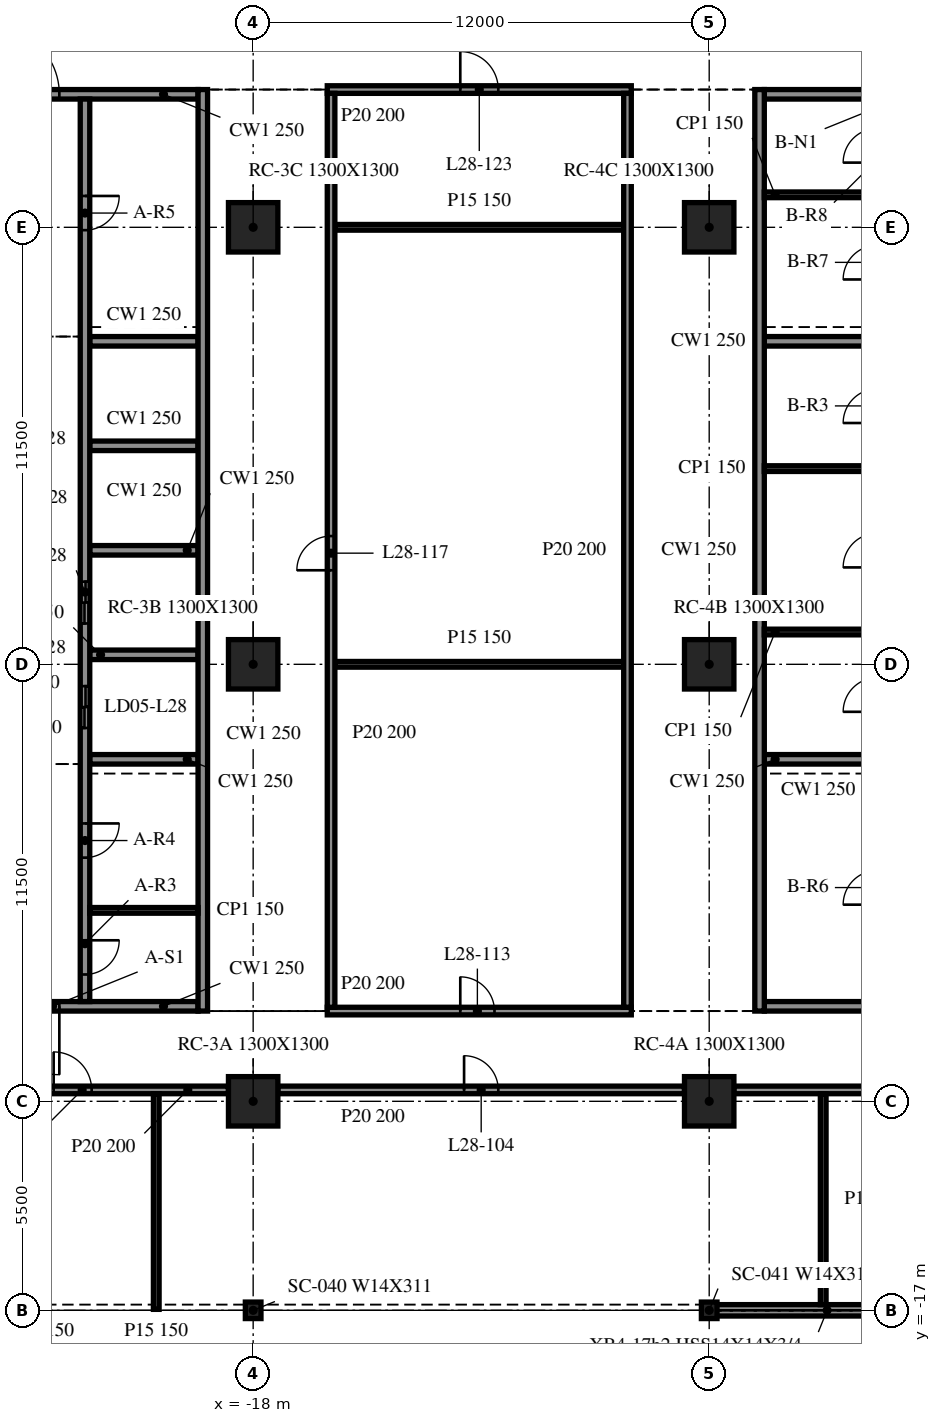
"""IFC4 building model, lengths in metres.
Left out: names, types, materials, properties, quantities, classifications, styles, units other than length and angle.
Written with IfcOpenShell. Run it as: python <this file> out.ifc"""

import sys

from ifc_helpers import new_model, si_unit, direction, frame, frame_2d, origin, origin_2d, place, context, subcontext, project, spatial, rectangle, i_section, extrude, element, fill, save


model = new_model("IFC4")
c1 = context("Model", 3, precision=1e-05, world=origin(), true_north=direction((0.0, 1.0)))
c2 = subcontext(c1, "Body", "Model", "MODEL_VIEW")
j1 = project(units=[si_unit("LENGTHUNIT", "METRE"), si_unit("PLANEANGLEUNIT", "RADIAN")], contexts=[c1])
p1 = place(None, origin())
s1 = spatial("IfcSite", under=j1, at=p1, CompositionType="ELEMENT")
p2 = place(p1, origin())
s2 = spatial("IfcBuilding", under=s1, at=p2, CompositionType="ELEMENT")
p3 = place(p2, frame((0.0, 0.0, 122.0)))
s3 = spatial("IfcBuildingStorey", under=s2, at=p3, CompositionType="ELEMENT", Elevation=122.0)
for number, where, z_axis, x_axis in (
    (1, (-18.0, -11.5, -0.34), (0.0, 0.0, 1.0), (1.0, 0.0, 0.0)),
    (2, (-18.0, 0.0, -0.34), (0.0, 0.0, 1.0), (1.0, 0.0, 0.0)),
    (3, (-18.0, 11.5, -0.34), (0.0, 0.0, 1.0), (1.0, 0.0, 0.0)),
    (4, (-6.0, -11.5, -0.34), (0.0, 0.0, 1.0), (1.0, 0.0, 0.0)),
    (5, (-6.0, 0.0, -0.34), (0.0, 0.0, 1.0), (1.0, 0.0, 0.0)),
    (6, (-6.0, 11.5, -0.34), (0.0, 0.0, 1.0), (1.0, 0.0, 0.0)),
):
    element("IfcColumn", number, at=place(p3, frame(where, z_axis=z_axis, x_axis=x_axis)), inside=s3, PredefinedType="COLUMN", context=c2, shape_type="SweptSolid", body=[
        extrude(rectangle(XDim=1.3, YDim=1.3, at=origin_2d()), origin(), (0.0, 0.0, 1.0), 4.1),
    ])
for number, where, z_axis, x_axis in (
    (7, (-18.0, -17.0, -0.34), (0.0, 0.0, 1.0), (1.0, 0.0, 0.0)),
    (8, (-6.0, -17.0, -0.34), (0.0, 0.0, 1.0), (1.0, 0.0, 0.0)),
):
    element("IfcColumn", number, at=place(p3, frame(where, z_axis=z_axis, x_axis=x_axis)), inside=s3, PredefinedType="COLUMN", context=c2, shape_type="SweptSolid", body=[
        extrude(i_section(OverallWidth=0.412, OverallDepth=0.434, WebThickness=0.036, FlangeThickness=0.057, at=origin_2d()), origin(), (0.0, 0.0, 1.0), 4.1),
    ])
p4 = place(p3, frame((-5.982, -17.0, 0.0), z_axis=(0.0, 0.0, 1.0), x_axis=(1.0, 0.0, 0.0)))
e9 = element("IfcWall", 9, at=p4, inside=s3, PredefinedType="NOTDEFINED", context=c2, shape_type="SweptSolid", body=[
    extrude(rectangle(XDim=11.964, YDim=0.3, at=frame_2d((5.982, 0.0))), origin(), (0.0, 0.0, 1.0), 3.003),
])
p5 = place(p3, frame((-19.325, -9.125, 0.0), z_axis=(0.0, 0.0, 1.0), x_axis=(0.0, 1.0, 0.0)))
e10 = element("IfcWall", 10, at=p5, inside=s3, PredefinedType="SOLIDWALL", context=c2, shape_type="SweptSolid", body=[
    extrude(rectangle(XDim=24.25, YDim=0.25, at=frame_2d((12.125, 0.0))), origin(), (0.0, 0.0, 1.0), 3.76),
])
p6 = place(p3, frame((-19.45, -9.0, 0.0), z_axis=(0.0, 0.0, 1.0), x_axis=(-1.0, 0.0, 0.0)))
e11 = element("IfcWall", 11, at=p6, inside=s3, PredefinedType="SOLIDWALL", context=c2, shape_type="SweptSolid", body=[
    extrude(rectangle(XDim=9.1, YDim=0.25, at=frame_2d((4.55, 0.0))), origin(), (0.0, 0.0, 1.0), 3.76),
])
p7 = place(p6, frame((3.65, 0.0, 0.0)))
e12 = element("IfcOpeningElement", 12, at=p7, cuts=e11, PredefinedType="OPENING", context=c2, shape_type="SweptSolid", body=[
    extrude(rectangle(XDim=1.8, YDim=2.1, at=frame_2d((0.9, 1.05))), frame((0.0, 0.135, 0.0), z_axis=(0.0, -1.0, 0.0), x_axis=(1.0, 0.0, 0.0)), (0.0, 0.0, 1.0), 0.27),
])
p8 = place(p3, frame((-28.55, 15.0, 0.0), z_axis=(0.0, 0.0, 1.0), x_axis=(1.0, 0.0, 0.0)))
e13 = element("IfcWall", 13, at=p8, inside=s3, PredefinedType="SOLIDWALL", context=c2, shape_type="SweptSolid", body=[
    extrude(rectangle(XDim=9.1, YDim=0.25, at=frame_2d((4.55, 0.0))), origin(), (0.0, 0.0, 1.0), 3.76),
])
p9 = place(p8, frame((3.65, 0.0, 0.0)))
e14 = element("IfcOpeningElement", 14, at=p9, cuts=e13, PredefinedType="OPENING", context=c2, shape_type="SweptSolid", body=[
    extrude(rectangle(XDim=1.8, YDim=2.1, at=frame_2d((0.9, 1.05))), frame((0.0, 0.135, 0.0), z_axis=(0.0, -1.0, 0.0), x_axis=(1.0, 0.0, 0.0)), (0.0, 0.0, 1.0), 0.27),
])
p10 = place(p3, frame((-22.425, 14.875, 0.0), z_axis=(0.0, 0.0, 1.0), x_axis=(0.0, -1.0, 0.0)))
e15 = element("IfcWall", 15, at=p10, inside=s3, PredefinedType="SOLIDWALL", context=c2, shape_type="SweptSolid", body=[
    extrude(rectangle(XDim=23.75, YDim=0.25, at=frame_2d((11.875, 0.0))), origin(), (0.0, 0.0, 1.0), 3.76),
])
p11 = place(p10, frame((15.45, 0.0, 0.0)))
e16 = element("IfcOpeningElement", 16, at=p11, cuts=e15, PredefinedType="OPENING", context=c2, shape_type="SweptSolid", body=[
    extrude(rectangle(XDim=1.1, YDim=2.1, at=frame_2d((0.55, 1.05))), frame((0.0, 0.135, 0.0), z_axis=(0.0, -1.0, 0.0), x_axis=(1.0, 0.0, 0.0)), (0.0, 0.0, 1.0), 0.27),
])
p12 = place(p10, frame((12.7, 0.0, 0.0)))
e17 = element("IfcOpeningElement", 17, at=p12, cuts=e15, PredefinedType="OPENING", context=c2, shape_type="SweptSolid", body=[
    extrude(rectangle(XDim=1.1, YDim=2.1, at=frame_2d((0.55, 1.05))), frame((0.0, 0.135, 0.0), z_axis=(0.0, -1.0, 0.0), x_axis=(1.0, 0.0, 0.0)), (0.0, 0.0, 1.0), 0.27),
])
p13 = place(p10, frame((22.137, 0.0, 0.0)))
e18 = element("IfcOpeningElement", 18, at=p13, cuts=e15, PredefinedType="OPENING", context=c2, shape_type="SweptSolid", body=[
    extrude(rectangle(XDim=0.9, YDim=2.1, at=frame_2d((0.45, 1.05))), frame((0.0, 0.135, 0.0), z_axis=(0.0, -1.0, 0.0), x_axis=(1.0, 0.0, 0.0)), (0.0, 0.0, 1.0), 0.27),
])
p14 = place(p10, frame((19.062, 0.0, 0.0)))
e19 = element("IfcOpeningElement", 19, at=p14, cuts=e15, PredefinedType="OPENING", context=c2, shape_type="SweptSolid", body=[
    extrude(rectangle(XDim=0.9, YDim=2.1, at=frame_2d((0.45, 1.05))), frame((0.0, 0.135, 0.0), z_axis=(0.0, -1.0, 0.0), x_axis=(1.0, 0.0, 0.0)), (0.0, 0.0, 1.0), 0.27),
])
p15 = place(p10, frame((2.55, 0.0, 0.0)))
e20 = element("IfcOpeningElement", 20, at=p15, cuts=e15, PredefinedType="OPENING", context=c2, shape_type="SweptSolid", body=[
    extrude(rectangle(XDim=0.9, YDim=2.1, at=frame_2d((0.45, 1.05))), frame((0.0, 0.135, 0.0), z_axis=(0.0, -1.0, 0.0), x_axis=(1.0, 0.0, 0.0)), (0.0, 0.0, 1.0), 0.27),
])
for number, where, z_axis, x_axis in (
    (21, (-22.3, -2.5, 0.0), (0.0, 0.0, 1.0), (1.0, 0.0, 0.0)),
    (22, (-22.3, 0.25, 0.0), (0.0, 0.0, 1.0), (1.0, 0.0, 0.0)),
    (23, (-22.3, 3.0, 0.0), (0.0, 0.0, 1.0), (1.0, 0.0, 0.0)),
    (24, (-22.3, 5.75, 0.0), (0.0, 0.0, 1.0), (1.0, 0.0, 0.0)),
    (25, (-22.3, 8.5, 0.0), (0.0, 0.0, 1.0), (1.0, 0.0, 0.0)),
):
    element("IfcWall", number, at=place(p3, frame(where, z_axis=z_axis, x_axis=x_axis)), inside=s3, PredefinedType="SOLIDWALL", context=c2, shape_type="SweptSolid", body=[
        extrude(rectangle(XDim=2.85, YDim=0.25, at=frame_2d((1.425, 0.0))), origin(), (0.0, 0.0, 1.0), 3.76),
    ])
p16 = place(p3, frame((-22.3, -6.475, 0.0), z_axis=(0.0, 0.0, 1.0), x_axis=(1.0, 0.0, 0.0)))
e26 = element("IfcWall", 26, at=p16, inside=s3, PredefinedType="PARTITIONING", context=c2, shape_type="SweptSolid", body=[
    extrude(rectangle(XDim=2.85, YDim=0.15, at=frame_2d((1.425, 0.0))), origin(), (0.0, 0.0, 1.0), 3.76),
])
p17 = place(p3, frame((-4.675, 15.125, 0.0), z_axis=(0.0, 0.0, 1.0), x_axis=(0.0, -1.0, 0.0)))
e27 = element("IfcWall", 27, at=p17, inside=s3, PredefinedType="SOLIDWALL", context=c2, shape_type="SweptSolid", body=[
    extrude(rectangle(XDim=24.25, YDim=0.25, at=frame_2d((12.125, 0.0))), origin(), (0.0, 0.0, 1.0), 3.76),
])
p18 = place(p3, frame((4.55, -9.0, 0.0), z_axis=(0.0, 0.0, 1.0), x_axis=(-1.0, 0.0, 0.0)))
e28 = element("IfcWall", 28, at=p18, inside=s3, PredefinedType="SOLIDWALL", context=c2, shape_type="SweptSolid", body=[
    extrude(rectangle(XDim=9.1, YDim=0.25, at=frame_2d((4.55, 0.0))), origin(), (0.0, 0.0, 1.0), 3.76),
])
p19 = place(p18, frame((3.65, 0.0, 0.0)))
e29 = element("IfcOpeningElement", 29, at=p19, cuts=e28, PredefinedType="OPENING", context=c2, shape_type="SweptSolid", body=[
    extrude(rectangle(XDim=1.8, YDim=2.1, at=frame_2d((0.9, 1.05))), frame((0.0, 0.135, 0.0), z_axis=(0.0, -1.0, 0.0), x_axis=(1.0, 0.0, 0.0)), (0.0, 0.0, 1.0), 0.27),
])
p20 = place(p3, frame((-4.55, 15.0, 0.0), z_axis=(0.0, 0.0, 1.0), x_axis=(1.0, 0.0, 0.0)))
e30 = element("IfcWall", 30, at=p20, inside=s3, PredefinedType="SOLIDWALL", context=c2, shape_type="SweptSolid", body=[
    extrude(rectangle(XDim=9.1, YDim=0.25, at=frame_2d((4.55, 0.0))), origin(), (0.0, 0.0, 1.0), 3.76),
])
p21 = place(p20, frame((3.65, 0.0, 0.0)))
e31 = element("IfcOpeningElement", 31, at=p21, cuts=e30, PredefinedType="OPENING", context=c2, shape_type="SweptSolid", body=[
    extrude(rectangle(XDim=1.8, YDim=2.1, at=frame_2d((0.9, 1.05))), frame((0.0, 0.135, 0.0), z_axis=(0.0, -1.0, 0.0), x_axis=(1.0, 0.0, 0.0)), (0.0, 0.0, 1.0), 0.27),
])
for number, where, z_axis, x_axis in (
    (32, (-4.55, -2.5, 0.0), (0.0, 0.0, 1.0), (1.0, 0.0, 0.0)),
    (33, (-4.55, 8.5, 0.0), (0.0, 0.0, 1.0), (1.0, 0.0, 0.0)),
):
    element("IfcWall", number, at=place(p3, frame(where, z_axis=z_axis, x_axis=x_axis)), inside=s3, PredefinedType="SOLIDWALL", context=c2, shape_type="SweptSolid", body=[
        extrude(rectangle(XDim=2.85, YDim=0.25, at=frame_2d((1.425, 0.0))), origin(), (0.0, 0.0, 1.0), 3.76),
    ])
for number, where, z_axis, x_axis in (
    (34, (-4.55, 0.85, 0.0), (0.0, 0.0, 1.0), (1.0, 0.0, 0.0)),
    (35, (-4.55, 5.15, 0.0), (0.0, 0.0, 1.0), (1.0, 0.0, 0.0)),
    (36, (-4.55, 12.355, 0.0), (0.0, 0.0, 1.0), (1.0, 0.0, 0.0)),
):
    element("IfcWall", number, at=place(p3, frame(where, z_axis=z_axis, x_axis=x_axis)), inside=s3, PredefinedType="PARTITIONING", context=c2, shape_type="SweptSolid", body=[
        extrude(rectangle(XDim=2.85, YDim=0.15, at=frame_2d((1.425, 0.0))), origin(), (0.0, 0.0, 1.0), 3.76),
    ])
p22 = place(p3, frame((-29.35, -11.2, 0.0), z_axis=(0.0, 0.0, 1.0), x_axis=(1.0, 0.0, 0.0)))
e37 = element("IfcWall", 37, at=p22, inside=s3, PredefinedType="PARTITIONING", context=c2, shape_type="SweptSolid", body=[
    extrude(rectangle(XDim=10.7, YDim=0.2, at=frame_2d((5.35, 0.0))), origin(), (0.0, 0.0, 1.0), 3.76),
])
p23 = place(p22, frame((4.5, 0.0, 0.0)))
e38 = element("IfcOpeningElement", 38, at=p23, cuts=e37, PredefinedType="OPENING", context=c2, shape_type="SweptSolid", body=[
    extrude(rectangle(XDim=1.0, YDim=2.1, at=frame_2d((0.5, 1.05))), frame((0.0, 0.11, 0.0), z_axis=(0.0, -1.0, 0.0), x_axis=(1.0, 0.0, 0.0)), (0.0, 0.0, 1.0), 0.22),
])
p24 = place(p22, frame((6.1, 0.0, 0.0)))
e39 = element("IfcOpeningElement", 39, at=p24, cuts=e37, PredefinedType="OPENING", context=c2, shape_type="SweptSolid", body=[
    extrude(rectangle(XDim=1.0, YDim=2.1, at=frame_2d((0.5, 1.05))), frame((0.0, 0.11, 0.0), z_axis=(0.0, -1.0, 0.0), x_axis=(1.0, 0.0, 0.0)), (0.0, 0.0, 1.0), 0.22),
])
p25 = place(p3, frame((-17.35, -11.2, 0.0), z_axis=(0.0, 0.0, 1.0), x_axis=(1.0, 0.0, 0.0)))
e40 = element("IfcWall", 40, at=p25, inside=s3, PredefinedType="PARTITIONING", context=c2, shape_type="SweptSolid", body=[
    extrude(rectangle(XDim=10.7, YDim=0.2, at=frame_2d((5.35, 0.0))), origin(), (0.0, 0.0, 1.0), 3.76),
])
p26 = place(p25, frame((4.9, 0.0, 0.0)))
e41 = element("IfcOpeningElement", 41, at=p26, cuts=e40, PredefinedType="OPENING", context=c2, shape_type="SweptSolid", body=[
    extrude(rectangle(XDim=0.9, YDim=2.1, at=frame_2d((0.45, 1.05))), frame((0.0, 0.11, 0.0), z_axis=(0.0, -1.0, 0.0), x_axis=(1.0, 0.0, 0.0)), (0.0, 0.0, 1.0), 0.22),
])
p27 = place(p3, frame((-5.35, -11.2, 0.0), z_axis=(0.0, 0.0, 1.0), x_axis=(1.0, 0.0, 0.0)))
e42 = element("IfcWall", 42, at=p27, inside=s3, PredefinedType="PARTITIONING", context=c2, shape_type="SweptSolid", body=[
    extrude(rectangle(XDim=10.7, YDim=0.2, at=frame_2d((5.35, 0.0))), origin(), (0.0, 0.0, 1.0), 3.76),
])
p28 = place(p27, frame((4.7, 0.0, 0.0)))
e43 = element("IfcOpeningElement", 43, at=p28, cuts=e42, PredefinedType="OPENING", context=c2, shape_type="SweptSolid", body=[
    extrude(rectangle(XDim=1.2, YDim=2.1, at=frame_2d((0.6, 1.05))), frame((0.0, 0.11, 0.0), z_axis=(0.0, -1.0, 0.0), x_axis=(1.0, 0.0, 0.0)), (0.0, 0.0, 1.0), 0.22),
])
p29 = place(p27, frame((8.7, 0.0, 0.0)))
e44 = element("IfcOpeningElement", 44, at=p29, cuts=e42, PredefinedType="OPENING", context=c2, shape_type="SweptSolid", body=[
    extrude(rectangle(XDim=0.9, YDim=2.1, at=frame_2d((0.45, 1.05))), frame((0.0, 0.11, 0.0), z_axis=(0.0, -1.0, 0.0), x_axis=(1.0, 0.0, 0.0)), (0.0, 0.0, 1.0), 0.22),
])
p30 = place(p3, frame((-16.05, -9.125, 0.0), z_axis=(0.0, 0.0, 1.0), x_axis=(1.0, 0.0, 0.0)))
e45 = element("IfcWall", 45, at=p30, inside=s3, PredefinedType="PARTITIONING", context=c2, shape_type="SweptSolid", body=[
    extrude(rectangle(XDim=8.0, YDim=0.2, at=frame_2d((4.0, 0.0))), origin(), (0.0, 0.0, 1.0), 3.76),
])
p31 = place(p30, frame((3.5, 0.0, 0.0)))
e46 = element("IfcOpeningElement", 46, at=p31, cuts=e45, PredefinedType="OPENING", context=c2, shape_type="SweptSolid", body=[
    extrude(rectangle(XDim=0.9, YDim=2.1, at=frame_2d((0.45, 1.05))), frame((0.0, 0.11, 0.0), z_axis=(0.0, -1.0, 0.0), x_axis=(1.0, 0.0, 0.0)), (0.0, 0.0, 1.0), 0.22),
])
for number, where, z_axis, x_axis in (
    (47, (-15.85, 0.0, 0.0), (0.0, 0.0, 1.0), (1.0, 0.0, 0.0)),
    (48, (-15.85, 11.5, 0.0), (0.0, 0.0, 1.0), (1.0, 0.0, 0.0)),
):
    element("IfcWall", number, at=place(p3, frame(where, z_axis=z_axis, x_axis=x_axis)), inside=s3, PredefinedType="PARTITIONING", context=c2, shape_type="SweptSolid", body=[
        extrude(rectangle(XDim=7.6, YDim=0.15, at=frame_2d((3.8, 0.0))), origin(), (0.0, 0.0, 1.0), 3.76),
    ])
p32 = place(p3, frame((-16.05, 15.125, 0.0), z_axis=(0.0, 0.0, 1.0), x_axis=(1.0, 0.0, 0.0)))
e49 = element("IfcWall", 49, at=p32, inside=s3, PredefinedType="PARTITIONING", context=c2, shape_type="SweptSolid", body=[
    extrude(rectangle(XDim=8.0, YDim=0.2, at=frame_2d((4.0, 0.0))), origin(), (0.0, 0.0, 1.0), 3.76),
])
p33 = place(p32, frame((3.5, 0.0, 0.0)))
e50 = element("IfcOpeningElement", 50, at=p33, cuts=e49, PredefinedType="OPENING", context=c2, shape_type="SweptSolid", body=[
    extrude(rectangle(XDim=1.0, YDim=2.1, at=frame_2d((0.5, 1.05))), frame((0.0, 0.11, 0.0), z_axis=(0.0, -1.0, 0.0), x_axis=(1.0, 0.0, 0.0)), (0.0, 0.0, 1.0), 0.22),
])
p34 = place(p3, frame((-20.55, -16.975, 0.0), z_axis=(0.0, 0.0, 1.0), x_axis=(0.0, 1.0, 0.0)))
e51 = element("IfcWall", 51, at=p34, inside=s3, PredefinedType="PARTITIONING", context=c2, shape_type="SweptSolid", body=[
    extrude(rectangle(XDim=5.675, YDim=0.15, at=frame_2d((2.837, 0.0))), origin(), (0.0, 0.0, 1.0), 3.76),
])
p35 = place(p3, frame((-15.95, -9.025, 0.0), z_axis=(0.0, 0.0, 1.0), x_axis=(0.0, 1.0, 0.0)))
e52 = element("IfcWall", 52, at=p35, inside=s3, PredefinedType="PARTITIONING", context=c2, shape_type="SweptSolid", body=[
    extrude(rectangle(XDim=24.05, YDim=0.2, at=frame_2d((12.025, 0.0))), origin(), (0.0, 0.0, 1.0), 3.76),
])
p36 = place(p35, frame((11.5, 0.0, 0.0)))
e53 = element("IfcOpeningElement", 53, at=p36, cuts=e52, PredefinedType="OPENING", context=c2, shape_type="SweptSolid", body=[
    extrude(rectangle(XDim=0.9, YDim=2.1, at=frame_2d((0.45, 1.05))), frame((0.0, 0.11, 0.0), z_axis=(0.0, -1.0, 0.0), x_axis=(1.0, 0.0, 0.0)), (0.0, 0.0, 1.0), 0.22),
])
p37 = place(p3, frame((-8.15, -9.025, 0.0), z_axis=(0.0, 0.0, 1.0), x_axis=(0.0, 1.0, 0.0)))
e54 = element("IfcWall", 54, at=p37, inside=s3, PredefinedType="PARTITIONING", context=c2, shape_type="SweptSolid", body=[
    extrude(rectangle(XDim=24.05, YDim=0.2, at=frame_2d((12.025, 0.0))), origin(), (0.0, 0.0, 1.0), 3.76),
])
p38 = place(p3, frame((-3.0, -16.85, 0.0), z_axis=(0.0, 0.0, 1.0), x_axis=(0.0, 1.0, 0.0)))
e55 = element("IfcWall", 55, at=p38, inside=s3, PredefinedType="PARTITIONING", context=c2, shape_type="SweptSolid", body=[
    extrude(rectangle(XDim=5.55, YDim=0.15, at=frame_2d((2.775, 0.0))), origin(), (0.0, 0.0, 1.0), 3.76),
])
p39 = place(p7, origin())
e56 = element("IfcDoor", 56, at=p39, inside=s3, OperationType="DOUBLE_DOOR_SINGLE_SWING", PredefinedType="DOOR", context=c2, shape_type="SweptSolid", body=[
    extrude(rectangle(XDim=1.8, YDim=2.1, at=frame_2d((0.9, 1.05))), frame((0.0, 0.025, 0.0), z_axis=(0.0, -1.0, 0.0), x_axis=(1.0, 0.0, 0.0)), (0.0, 0.0, 1.0), 0.05),
])
fill(e12, e56)
p40 = place(p9, origin())
e57 = element("IfcDoor", 57, at=p40, inside=s3, OperationType="DOUBLE_DOOR_SINGLE_SWING", PredefinedType="DOOR", context=c2, shape_type="SweptSolid", body=[
    extrude(rectangle(XDim=1.8, YDim=2.1, at=frame_2d((0.9, 1.05))), frame((0.0, 0.025, 0.0), z_axis=(0.0, -1.0, 0.0), x_axis=(1.0, 0.0, 0.0)), (0.0, 0.0, 1.0), 0.05),
])
fill(e14, e57)
p41 = place(p11, origin())
e58 = element("IfcDoor", 58, at=p41, inside=s3, OperationType="DOUBLE_DOOR_SLIDING", PredefinedType="DOOR", context=c2, shape_type="SweptSolid", body=[
    extrude(rectangle(XDim=1.1, YDim=2.1, at=frame_2d((0.55, 1.05))), frame((0.0, 0.025, 0.0), z_axis=(0.0, -1.0, 0.0), x_axis=(1.0, 0.0, 0.0)), (0.0, 0.0, 1.0), 0.05),
])
fill(e16, e58)
p42 = place(p12, origin())
e59 = element("IfcDoor", 59, at=p42, inside=s3, OperationType="DOUBLE_DOOR_SLIDING", PredefinedType="DOOR", context=c2, shape_type="SweptSolid", body=[
    extrude(rectangle(XDim=1.1, YDim=2.1, at=frame_2d((0.55, 1.05))), frame((0.0, 0.025, 0.0), z_axis=(0.0, -1.0, 0.0), x_axis=(1.0, 0.0, 0.0)), (0.0, 0.0, 1.0), 0.05),
])
fill(e17, e59)
p43 = place(p13, origin())
e60 = element("IfcDoor", 60, at=p43, inside=s3, OperationType="SINGLE_SWING_LEFT", PredefinedType="DOOR", context=c2, shape_type="SweptSolid", body=[
    extrude(rectangle(XDim=0.9, YDim=2.1, at=frame_2d((0.45, 1.05))), frame((0.0, 0.025, 0.0), z_axis=(0.0, -1.0, 0.0), x_axis=(1.0, 0.0, 0.0)), (0.0, 0.0, 1.0), 0.05),
])
fill(e18, e60)
p44 = place(p14, origin())
e61 = element("IfcDoor", 61, at=p44, inside=s3, OperationType="SINGLE_SWING_RIGHT", PredefinedType="DOOR", context=c2, shape_type="SweptSolid", body=[
    extrude(rectangle(XDim=0.9, YDim=2.1, at=frame_2d((0.45, 1.05))), frame((0.0, 0.025, 0.0), z_axis=(0.0, -1.0, 0.0), x_axis=(1.0, 0.0, 0.0)), (0.0, 0.0, 1.0), 0.05),
])
fill(e19, e61)
p45 = place(p15, origin())
e62 = element("IfcDoor", 62, at=p45, inside=s3, OperationType="SINGLE_SWING_LEFT", PredefinedType="DOOR", context=c2, shape_type="SweptSolid", body=[
    extrude(rectangle(XDim=0.9, YDim=2.1, at=frame_2d((0.45, 1.05))), frame((0.0, 0.025, 0.0), z_axis=(0.0, -1.0, 0.0), x_axis=(1.0, 0.0, 0.0)), (0.0, 0.0, 1.0), 0.05),
])
fill(e20, e62)
p46 = place(p24, origin())
e63 = element("IfcDoor", 63, at=p46, inside=s3, OperationType="SINGLE_SWING_LEFT", PredefinedType="DOOR", context=c2, shape_type="SweptSolid", body=[
    extrude(rectangle(XDim=1.0, YDim=2.1, at=frame_2d((0.5, 1.05))), frame((0.0, 0.025, 0.0), z_axis=(0.0, -1.0, 0.0), x_axis=(1.0, 0.0, 0.0)), (0.0, 0.0, 1.0), 0.05),
])
fill(e39, e63)
p47 = place(p26, origin())
e64 = element("IfcDoor", 64, at=p47, inside=s3, OperationType="SINGLE_SWING_LEFT", PredefinedType="DOOR", context=c2, shape_type="SweptSolid", body=[
    extrude(rectangle(XDim=0.9, YDim=2.1, at=frame_2d((0.45, 1.05))), frame((0.0, 0.025, 0.0), z_axis=(0.0, -1.0, 0.0), x_axis=(1.0, 0.0, 0.0)), (0.0, 0.0, 1.0), 0.05),
])
fill(e41, e64)
p48 = place(p31, origin())
e65 = element("IfcDoor", 65, at=p48, inside=s3, OperationType="SINGLE_SWING_LEFT", PredefinedType="DOOR", context=c2, shape_type="SweptSolid", body=[
    extrude(rectangle(XDim=0.9, YDim=2.1, at=frame_2d((0.45, 1.05))), frame((0.0, 0.025, 0.0), z_axis=(0.0, -1.0, 0.0), x_axis=(1.0, 0.0, 0.0)), (0.0, 0.0, 1.0), 0.05),
])
fill(e46, e65)
p49 = place(p36, origin())
e66 = element("IfcDoor", 66, at=p49, inside=s3, OperationType="SINGLE_SWING_RIGHT", PredefinedType="DOOR", context=c2, shape_type="SweptSolid", body=[
    extrude(rectangle(XDim=0.9, YDim=2.1, at=frame_2d((0.45, 1.05))), frame((0.0, 0.025, 0.0), z_axis=(0.0, -1.0, 0.0), x_axis=(1.0, 0.0, 0.0)), (0.0, 0.0, 1.0), 0.05),
])
fill(e53, e66)
p50 = place(p33, origin())
e67 = element("IfcDoor", 67, at=p50, inside=s3, OperationType="SINGLE_SWING_RIGHT", PredefinedType="DOOR", context=c2, shape_type="SweptSolid", body=[
    extrude(rectangle(XDim=1.0, YDim=2.1, at=frame_2d((0.5, 1.05))), frame((0.0, 0.025, 0.0), z_axis=(0.0, -1.0, 0.0), x_axis=(1.0, 0.0, 0.0)), (0.0, 0.0, 1.0), 0.05),
])
fill(e50, e67)
save(model, sys.argv[1])
